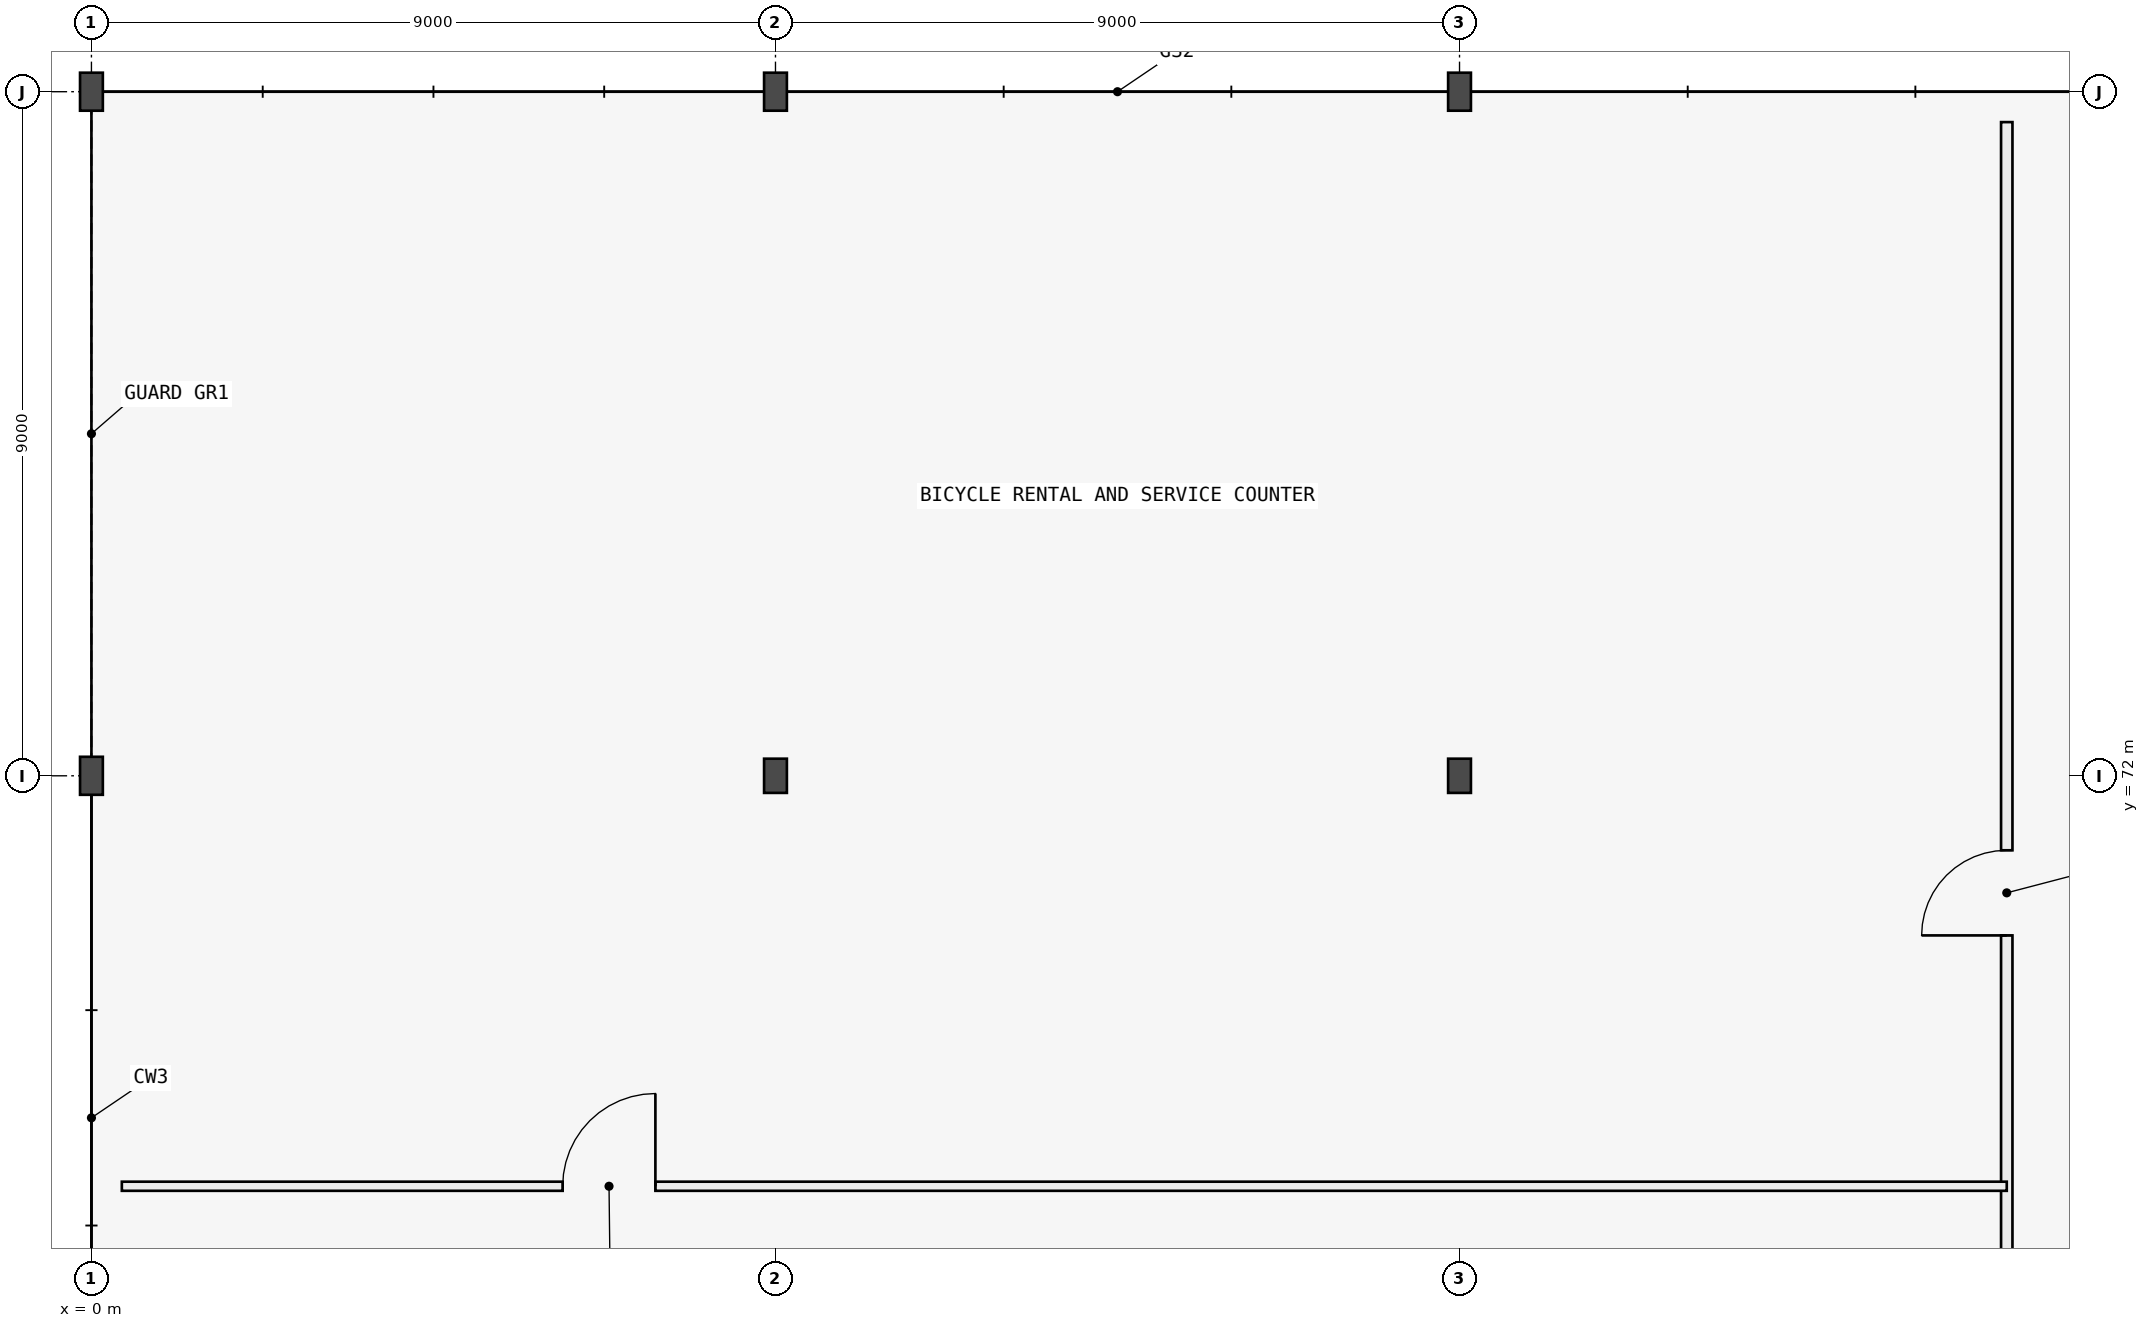
"""IFC4 building model, lengths in metres.
Left out: names, types, materials, properties, quantities, classifications, styles, units other than length and angle.
Written with IfcOpenShell. Run it as: python <this file> out.ifc"""

import sys

from ifc_helpers import new_model, si_unit, direction, frame, frame_2d, origin, origin_2d, place, context, subcontext, project, spatial, rectangle, i_section, extrude, element, fill, save


model = new_model("IFC4")
c1 = context("Model", 3, precision=1e-05, world=origin(), true_north=direction((0.0, 1.0)))
c2 = subcontext(c1, "Body", "Model", "MODEL_VIEW")
j1 = project(units=[si_unit("LENGTHUNIT", "METRE"), si_unit("PLANEANGLEUNIT", "RADIAN")], contexts=[c1])
p1 = place(None, origin())
s1 = spatial("IfcSite", under=j1, at=p1, CompositionType="ELEMENT")
p2 = place(p1, origin())
s2 = spatial("IfcBuilding", under=s1, at=p2, CompositionType="ELEMENT")
p3 = place(p2, origin())
s3 = spatial("IfcBuildingStorey", under=s2, at=p3, CompositionType="ELEMENT", Elevation=0.0)
p4 = place(p3, frame((0.0, 72.0, 0.0), z_axis=(0.0, 0.0, 1.0), x_axis=(1.0, 0.0, 0.0)))
e1 = element("IfcColumn", 1, at=p4, inside=s3, PredefinedType="COLUMN", context=c2, shape_type="SweptSolid", body=[
    extrude(i_section(OverallWidth=0.3, OverallDepth=0.5, WebThickness=0.014, FlangeThickness=0.028, FilletRadius=0.027, at=origin_2d()), origin(), (0.0, 0.0, 1.0), 4.2),
])
for number, where, z_axis, x_axis in (
    (2, (9.0, 72.0, 0.0), (0.0, 0.0, 1.0), (1.0, 0.0, 0.0)),
    (3, (18.0, 72.0, 0.0), (0.0, 0.0, 1.0), (1.0, 0.0, 0.0)),
):
    element("IfcColumn", number, at=place(p3, frame(where, z_axis=z_axis, x_axis=x_axis)), inside=s3, PredefinedType="COLUMN", context=c2, shape_type="SweptSolid", body=[
        extrude(i_section(OverallWidth=0.3, OverallDepth=0.45, WebThickness=0.014, FlangeThickness=0.026, FilletRadius=0.027, at=origin_2d()), origin(), (0.0, 0.0, 1.0), 4.2),
    ])
for number, where, z_axis, x_axis in (
    (4, (0.0, 81.0, 0.0), (0.0, 0.0, 1.0), (1.0, 0.0, 0.0)),
    (5, (9.0, 81.0, 0.0), (0.0, 0.0, 1.0), (1.0, 0.0, 0.0)),
    (6, (18.0, 81.0, 0.0), (0.0, 0.0, 1.0), (1.0, 0.0, 0.0)),
):
    element("IfcColumn", number, at=place(p3, frame(where, z_axis=z_axis, x_axis=x_axis)), inside=s3, PredefinedType="COLUMN", context=c2, shape_type="SweptSolid", body=[
        extrude(i_section(OverallWidth=0.3, OverallDepth=0.5, WebThickness=0.014, FlangeThickness=0.028, FilletRadius=0.027, at=origin_2d()), origin(), (0.0, 0.0, 1.0), 4.2),
    ])
p5 = place(p3, frame((25.2, 45.4, 0.0), z_axis=(0.0, 0.0, 1.0), x_axis=(0.0, 1.0, 0.0)))
e7 = element("IfcWall", 7, at=p5, inside=s3, PredefinedType="PARTITIONING", context=c2, shape_type="SweptSolid", body=[
    extrude(rectangle(XDim=35.2, YDim=0.15, at=frame_2d((17.6, 0.0))), origin(), (0.0, 0.0, 1.0), 3.95),
])
p6 = place(p5, frame((5.2, 0.0, 0.0)))
e8 = element("IfcOpeningElement", 8, at=p6, cuts=e7, PredefinedType="OPENING", context=c2, shape_type="SweptSolid", body=[
    extrude(rectangle(XDim=1.02, YDim=2.12, at=frame_2d((0.51, 1.06))), frame((0.0, 0.085, 0.0), z_axis=(0.0, -1.0, 0.0), x_axis=(1.0, 0.0, 0.0)), (0.0, 0.0, 1.0), 0.17),
])
p7 = place(p5, frame((24.5, 0.0, 0.0)))
e9 = element("IfcOpeningElement", 9, at=p7, cuts=e7, PredefinedType="OPENING", context=c2, shape_type="SweptSolid", body=[
    extrude(rectangle(XDim=1.12, YDim=2.15, at=frame_2d((0.56, 1.075))), frame((0.0, 0.085, 0.0), z_axis=(0.0, -1.0, 0.0), x_axis=(1.0, 0.0, 0.0)), (0.0, 0.0, 1.0), 0.17),
])
p8 = place(p3, frame((0.4, 66.6, 0.0), z_axis=(0.0, 0.0, 1.0), x_axis=(1.0, 0.0, 0.0)))
e10 = element("IfcWall", 10, at=p8, inside=s3, PredefinedType="PARTITIONING", context=c2, shape_type="SweptSolid", body=[
    extrude(rectangle(XDim=24.8, YDim=0.12, at=frame_2d((12.4, 0.0))), origin(), (0.0, 0.0, 1.0), 3.95),
])
p9 = place(p8, frame((5.8, 0.0, 0.0)))
e11 = element("IfcOpeningElement", 11, at=p9, cuts=e10, PredefinedType="OPENING", context=c2, shape_type="SweptSolid", body=[
    extrude(rectangle(XDim=1.22, YDim=2.18, at=frame_2d((0.61, 1.09))), frame((0.0, 0.07, 0.0), z_axis=(0.0, -1.0, 0.0), x_axis=(1.0, 0.0, 0.0)), (0.0, 0.0, 1.0), 0.14),
])
p10 = place(p7, origin())
e12 = element("IfcDoor", 12, at=p10, inside=s3, OperationType="SINGLE_SWING_LEFT", PredefinedType="DOOR", context=c2, shape_type="SweptSolid", body=[
    extrude(rectangle(XDim=1.12, YDim=2.15, at=frame_2d((0.56, 1.075))), frame((0.0, 0.025, 0.0), z_axis=(0.0, -1.0, 0.0), x_axis=(1.0, 0.0, 0.0)), (0.0, 0.0, 1.0), 0.05),
])
fill(e9, e12)
p11 = place(p9, origin())
e13 = element("IfcDoor", 13, at=p11, inside=s3, OperationType="SINGLE_SWING_RIGHT", PredefinedType="DOOR", context=c2, shape_type="SweptSolid", body=[
    extrude(rectangle(XDim=1.22, YDim=2.18, at=frame_2d((0.61, 1.09))), frame((0.0, 0.025, 0.0), z_axis=(0.0, -1.0, 0.0), x_axis=(1.0, 0.0, 0.0)), (0.0, 0.0, 1.0), 0.05),
])
fill(e11, e13)
save(model, sys.argv[1])
